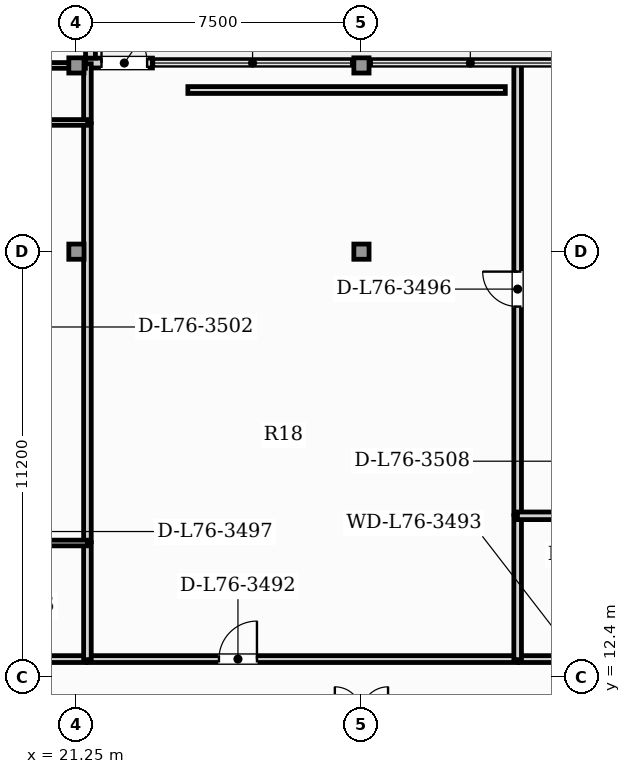
"""IFC4 building model, lengths in metres.
Left out: names, types, materials, properties, quantities, classifications, styles, units other than length and angle.
Written with IfcOpenShell. Run it as: python <this file> out.ifc"""

import sys

from ifc_helpers import new_model, si_unit, direction, frame, frame_2d, origin, origin_2d, place, context, subcontext, project, spatial, rectangle, hollow_rectangle, extrude, element, fill, save


model = new_model("IFC4")
c1 = context("Model", 3, precision=1e-05, world=origin(), true_north=direction((0.0, 1.0)))
c2 = subcontext(c1, "Body", "Model", "MODEL_VIEW")
j1 = project(units=[si_unit("LENGTHUNIT", "METRE"), si_unit("PLANEANGLEUNIT", "RADIAN")], contexts=[c1])
p1 = place(None, origin())
s1 = spatial("IfcSite", under=j1, at=p1, CompositionType="ELEMENT")
p2 = place(p1, origin())
s2 = spatial("IfcBuilding", under=s1, at=p2, CompositionType="ELEMENT")
p3 = place(p2, frame((0.0, 0.0, 308.0)))
s3 = spatial("IfcBuildingStorey", under=s2, at=p3, CompositionType="ELEMENT", Elevation=308.0)
for number, where, z_axis, x_axis in (
    (1, (21.25, 23.6, 0.0), (0.0, 0.0, 1.0), (1.0, 0.0, 0.0)),
    (2, (28.75, 23.6, 0.0), (0.0, 0.0, 1.0), (1.0, 0.0, 0.0)),
    (3, (21.25, 28.5, 0.0), (0.0, 0.0, 1.0), (1.0, 0.0, 0.0)),
    (4, (28.75, 28.5, 0.0), (0.0, 0.0, 1.0), (1.0, 0.0, 0.0)),
):
    element("IfcColumn", number, at=place(p3, frame(where, z_axis=z_axis, x_axis=x_axis)), inside=s3, PredefinedType="COLUMN", context=c2, shape_type="SweptSolid", body=[
        extrude(hollow_rectangle(XDim=0.4, YDim=0.4, WallThickness=0.02, at=origin_2d()), origin(), (0.0, 0.0, 1.0), 5.05),
    ])
p4 = place(p3, frame((21.49, 28.563, 0.0), z_axis=(0.0, 0.0, 1.0), x_axis=(1.0, 0.0, 0.0)))
e5 = element("IfcWall", 5, at=p4, inside=s3, PredefinedType="SOLIDWALL", context=c2, shape_type="SweptSolid", body=[
    extrude(rectangle(XDim=1.76, YDim=0.26, at=frame_2d((0.88, 0.0))), origin(), (0.0, 0.0, 1.0), 4.85),
])
p5 = place(p4, frame((0.42, 0.0, 0.0)))
e6 = element("IfcOpeningElement", 6, at=p5, cuts=e5, PredefinedType="OPENING", context=c2, shape_type="SweptSolid", body=[
    extrude(rectangle(XDim=1.2, YDim=2.2, at=frame_2d((0.6, 1.1))), frame((0.0, 0.14, 0.0), z_axis=(0.0, -1.0, 0.0), x_axis=(1.0, 0.0, 0.0)), (0.0, 0.0, 1.0), 0.28),
])
p6 = place(p3, frame((21.62, 28.693, 0.0), z_axis=(0.0, 0.0, 1.0), x_axis=(0.0, 1.0, 0.0)))
e7 = element("IfcWall", 7, at=p6, inside=s3, PredefinedType="SOLIDWALL", context=c2, shape_type="SweptSolid", body=[
    extrude(rectangle(XDim=4.56, YDim=0.26, at=frame_2d((2.28, 0.0))), origin(), (0.0, 0.0, 1.0), 4.85),
])
p7 = place(p6, frame((1.53, 0.0, 0.9)))
e8 = element("IfcOpeningElement", 8, at=p7, cuts=e7, PredefinedType="OPENING", context=c2, shape_type="SweptSolid", body=[
    extrude(rectangle(XDim=1.5, YDim=1.95, at=frame_2d((0.75, 0.975))), frame((0.0, 0.14, 0.0), z_axis=(0.0, -1.0, 0.0), x_axis=(1.0, 0.0, 0.0)), (0.0, 0.0, 1.0), 0.28),
])
p8 = place(p3, frame((21.535, 12.88, 0.0), z_axis=(0.0, 0.0, 1.0), x_axis=(1.0, 0.0, 0.0)))
e9 = element("IfcWall", 9, at=p8, inside=s3, PredefinedType="PARTITIONING", context=c2, shape_type="SweptSolid", body=[
    extrude(rectangle(XDim=11.33, YDim=0.18, at=frame_2d((5.665, 0.0))), origin(), (0.0, 0.0, 1.0), 4.85),
])
p9 = place(p8, frame((3.466, 0.0, 0.0)))
e10 = element("IfcOpeningElement", 10, at=p9, cuts=e9, PredefinedType="OPENING", context=c2, shape_type="SweptSolid", body=[
    extrude(rectangle(XDim=1.0, YDim=2.15, at=frame_2d((0.5, 1.075))), frame((0.0, 0.1, 0.0), z_axis=(0.0, -1.0, 0.0), x_axis=(1.0, 0.0, 0.0)), (0.0, 0.0, 1.0), 0.2),
])
p10 = place(p3, frame((32.895, 12.88, 0.0), z_axis=(0.0, 0.0, 1.0), x_axis=(1.0, 0.0, 0.0)))
e11 = element("IfcWall", 11, at=p10, inside=s3, PredefinedType="PARTITIONING", context=c2, shape_type="SweptSolid", body=[
    extrude(rectangle(XDim=3.07, YDim=0.18, at=frame_2d((1.535, 0.0))), origin(), (0.0, 0.0, 1.0), 4.85),
])
p11 = place(p10, frame((1.01, 0.0, 0.0)))
e12 = element("IfcOpeningElement", 12, at=p11, cuts=e11, PredefinedType="OPENING", context=c2, shape_type="SweptSolid", body=[
    extrude(rectangle(XDim=1.05, YDim=2.15, at=frame_2d((0.525, 1.075))), frame((0.0, 0.1, 0.0), z_axis=(0.0, -1.0, 0.0), x_axis=(1.0, 0.0, 0.0)), (0.0, 0.0, 1.0), 0.2),
])
p12 = place(p3, frame((18.067, 12.88, 0.0), z_axis=(0.0, 0.0, 1.0), x_axis=(1.0, 0.0, 0.0)))
e13 = element("IfcWall", 13, at=p12, inside=s3, PredefinedType="PARTITIONING", context=c2, shape_type="SweptSolid", body=[
    extrude(rectangle(XDim=3.438, YDim=0.18, at=frame_2d((1.719, 0.0))), origin(), (0.0, 0.0, 1.0), 4.85),
])
p13 = place(p3, frame((32.86, 12.865, 0.0), z_axis=(0.0, 0.0, 1.0), x_axis=(0.0, 1.0, 0.0)))
e14 = element("IfcWall", 14, at=p13, inside=s3, PredefinedType="PARTITIONING", context=c2, shape_type="SweptSolid", body=[
    extrude(rectangle(XDim=3.79, YDim=0.2, at=frame_2d((1.895, 0.0))), origin(), (0.0, 0.0, 1.0), 4.85),
])
p14 = place(p3, frame((32.86, 16.685, 0.0), z_axis=(0.0, 0.0, 1.0), x_axis=(0.0, 1.0, 0.0)))
e15 = element("IfcWall", 15, at=p14, inside=s3, PredefinedType="PARTITIONING", context=c2, shape_type="SweptSolid", body=[
    extrude(rectangle(XDim=11.86, YDim=0.2, at=frame_2d((5.93, 0.0))), origin(), (0.0, 0.0, 1.0), 4.85),
])
p15 = place(p14, frame((5.47, 0.0, 0.0)))
e16 = element("IfcOpeningElement", 16, at=p15, cuts=e15, PredefinedType="OPENING", context=c2, shape_type="SweptSolid", body=[
    extrude(rectangle(XDim=0.92, YDim=2.1, at=frame_2d((0.46, 1.05))), frame((0.0, 0.11, 0.0), z_axis=(0.0, -1.0, 0.0), x_axis=(1.0, 0.0, 0.0)), (0.0, 0.0, 1.0), 0.22),
])
p16 = place(p3, frame((21.54, 26.995, 0.0), z_axis=(0.0, 0.0, 1.0), x_axis=(0.0, 1.0, 0.0)))
e17 = element("IfcWall", 17, at=p16, inside=s3, PredefinedType="PARTITIONING", context=c2, shape_type="SweptSolid", body=[
    extrude(rectangle(XDim=1.549, YDim=0.2, at=frame_2d((0.774, 0.0))), origin(), (0.0, 0.0, 1.0), 4.85),
])
p17 = place(p3, frame((21.54, 12.865, 0.0), z_axis=(0.0, 0.0, 1.0), x_axis=(0.0, 1.0, 0.0)))
e18 = element("IfcWall", 18, at=p17, inside=s3, PredefinedType="PARTITIONING", context=c2, shape_type="SweptSolid", body=[
    extrude(rectangle(XDim=3.074, YDim=0.2, at=frame_2d((1.537, 0.0))), origin(), (0.0, 0.0, 1.0), 4.85),
])
p18 = place(p3, frame((21.54, 15.969, 0.0), z_axis=(0.0, 0.0, 1.0), x_axis=(0.0, 1.0, 0.0)))
e19 = element("IfcWall", 19, at=p18, inside=s3, PredefinedType="PARTITIONING", context=c2, shape_type="SweptSolid", body=[
    extrude(rectangle(XDim=10.996, YDim=0.2, at=frame_2d((5.498, 0.0))), origin(), (0.0, 0.0, 1.0), 4.85),
])
p19 = place(p3, frame((32.855, 16.65, 0.0), z_axis=(0.0, 0.0, 1.0), x_axis=(1.0, 0.0, 0.0)))
e20 = element("IfcWall", 20, at=p19, inside=s3, PredefinedType="PARTITIONING", context=c2, shape_type="SweptSolid", body=[
    extrude(rectangle(XDim=3.11, YDim=0.2, at=frame_2d((1.555, 0.0))), origin(), (0.0, 0.0, 1.0), 4.85),
])
p20 = place(p3, frame((18.027, 27.0, 0.0), z_axis=(0.0, 0.0, 1.0), x_axis=(1.0, 0.0, 0.0)))
e21 = element("IfcWall", 21, at=p20, inside=s3, PredefinedType="PARTITIONING", context=c2, shape_type="SweptSolid", body=[
    extrude(rectangle(XDim=3.518, YDim=0.15, at=frame_2d((1.759, 0.0))), origin(), (0.0, 0.0, 1.0), 4.85),
])
p21 = place(p3, frame((16.304, 28.5, 0.0), z_axis=(0.0, 0.0, 1.0), x_axis=(1.0, 0.0, 0.0)))
e22 = element("IfcWall", 22, at=p21, inside=s3, PredefinedType="PARTITIONING", context=c2, shape_type="SweptSolid", body=[
    extrude(rectangle(XDim=5.183, YDim=0.15, at=frame_2d((2.591, 0.0))), origin(), (0.0, 0.0, 1.0), 4.317),
])
p22 = place(p21, frame((2.131, 0.0, 0.0)))
e23 = element("IfcOpeningElement", 23, at=p22, cuts=e22, PredefinedType="OPENING", context=c2, shape_type="SweptSolid", body=[
    extrude(rectangle(XDim=0.92, YDim=2.1, at=frame_2d((0.46, 1.05))), frame((0.0, 0.085, 0.0), z_axis=(0.0, -1.0, 0.0), x_axis=(1.0, 0.0, 0.0)), (0.0, 0.0, 1.0), 0.17),
])
p23 = place(p3, frame((18.027, 15.934, 0.0), z_axis=(0.0, 0.0, 1.0), x_axis=(1.0, 0.0, 0.0)))
e24 = element("IfcWall", 24, at=p23, inside=s3, PredefinedType="PARTITIONING", context=c2, shape_type="SweptSolid", body=[
    extrude(rectangle(XDim=3.518, YDim=0.15, at=frame_2d((1.759, 0.0))), origin(), (0.0, 0.0, 1.0), 4.85),
])
p24 = place(p3, frame((24.183, 27.853, 0.0), z_axis=(0.0, 0.0, 1.0), x_axis=(1.0, 0.0, 0.0)))
e25 = element("IfcWall", 25, at=p24, inside=s3, PredefinedType="PARTITIONING", context=c2, shape_type="SweptSolid", body=[
    extrude(rectangle(XDim=8.352, YDim=0.18, at=frame_2d((4.176, 0.0))), origin(), (0.0, 0.0, 1.0), 4.85),
])
p25 = place(p5, origin())
e26 = element("IfcDoor", 26, at=p25, inside=s3, OperationType="SINGLE_SWING_LEFT", PredefinedType="DOOR", context=c2, shape_type="SweptSolid", body=[
    extrude(rectangle(XDim=1.2, YDim=2.2, at=frame_2d((0.6, 1.1))), frame((0.0, 0.025, 0.0), z_axis=(0.0, -1.0, 0.0), x_axis=(1.0, 0.0, 0.0)), (0.0, 0.0, 1.0), 0.05),
])
fill(e6, e26)
p26 = place(p9, origin())
e27 = element("IfcDoor", 27, at=p26, inside=s3, OperationType="SINGLE_SWING_RIGHT", PredefinedType="DOOR", context=c2, shape_type="SweptSolid", body=[
    extrude(rectangle(XDim=1.0, YDim=2.15, at=frame_2d((0.5, 1.075))), frame((0.0, 0.025, 0.0), z_axis=(0.0, -1.0, 0.0), x_axis=(1.0, 0.0, 0.0)), (0.0, 0.0, 1.0), 0.05),
])
fill(e10, e27)
p27 = place(p15, origin())
e28 = element("IfcDoor", 28, at=p27, inside=s3, OperationType="SINGLE_SWING_RIGHT", PredefinedType="DOOR", context=c2, shape_type="SweptSolid", body=[
    extrude(rectangle(XDim=0.92, YDim=2.1, at=frame_2d((0.46, 1.05))), frame((0.0, 0.025, 0.0), z_axis=(0.0, -1.0, 0.0), x_axis=(1.0, 0.0, 0.0)), (0.0, 0.0, 1.0), 0.05),
])
fill(e16, e28)
save(model, sys.argv[1])
